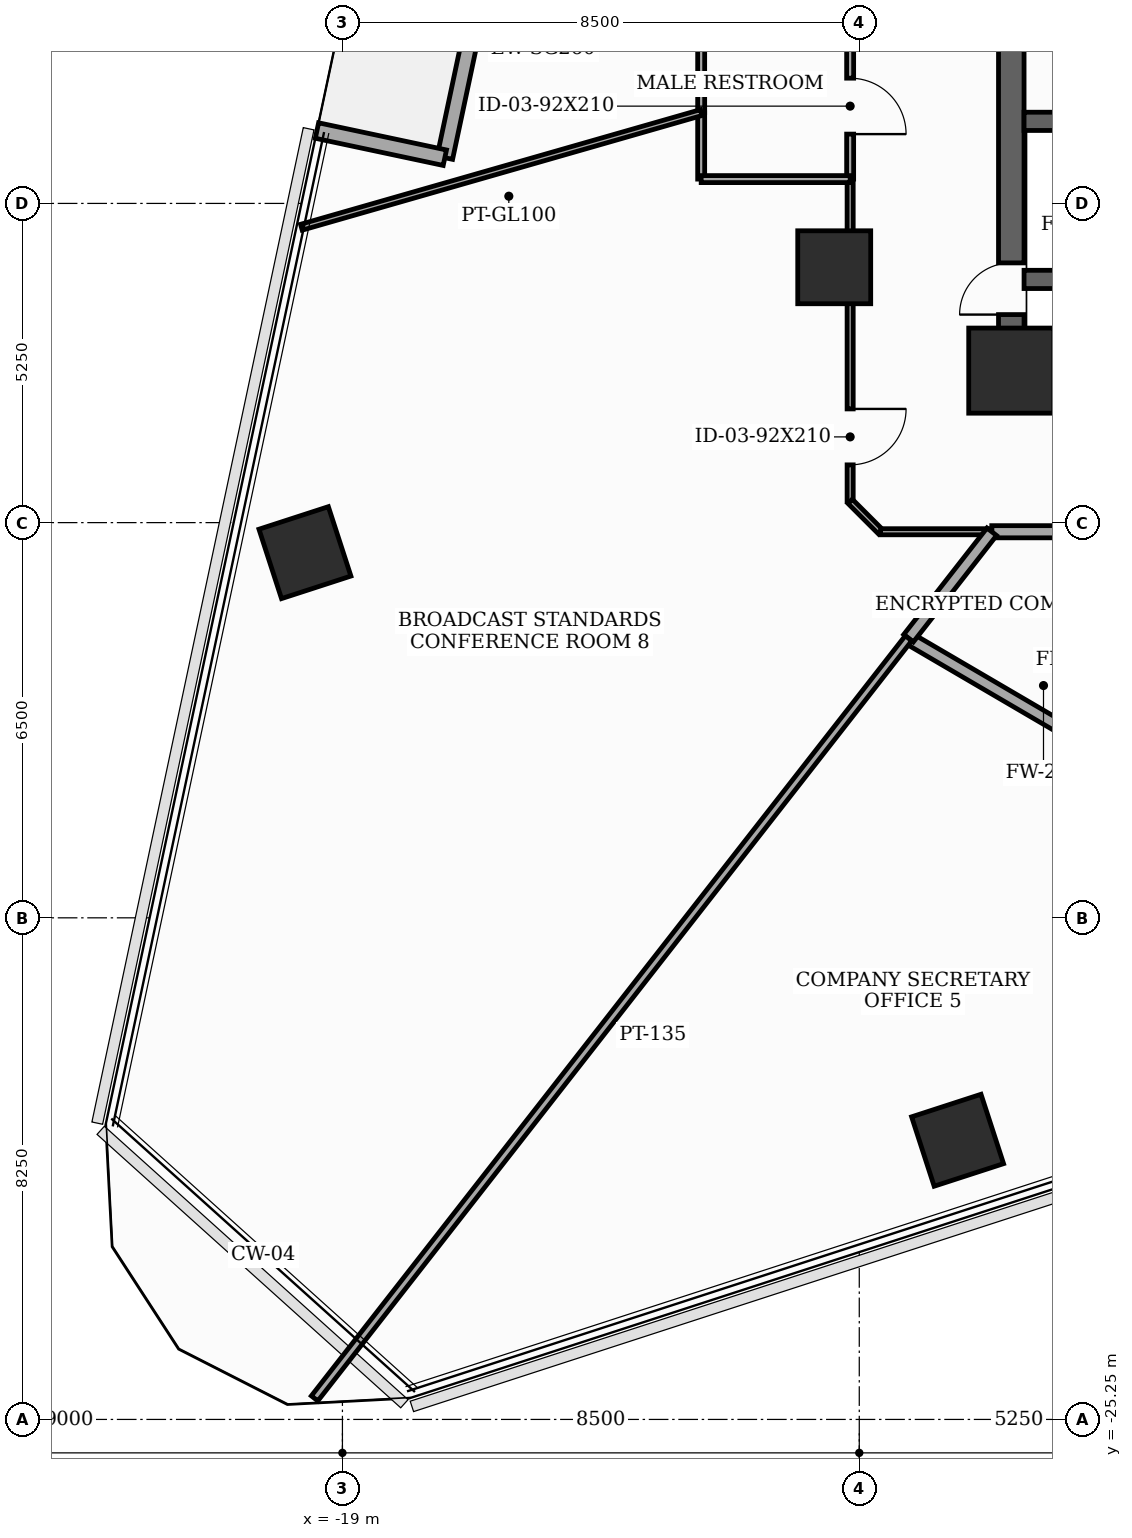
"""IFC4 building model, lengths in metres.
Left out: names, types, materials, properties, quantities, classifications, styles, units other than length and angle.
Written with IfcOpenShell. Run it as: python <this file> out.ifc"""

import sys

from ifc_helpers import new_model, si_unit, direction, frame, frame_2d, origin, origin_2d, place, context, subcontext, project, spatial, rectangle, extrude, element, fill, save


model = new_model("IFC4")
c1 = context("Model", 3, precision=1e-05, world=origin(), true_north=direction((0.0, 1.0)))
c2 = subcontext(c1, "Body", "Model", "MODEL_VIEW")
j1 = project(units=[si_unit("LENGTHUNIT", "METRE"), si_unit("PLANEANGLEUNIT", "RADIAN")], contexts=[c1])
p1 = place(None, origin())
s1 = spatial("IfcSite", under=j1, at=p1, CompositionType="ELEMENT")
p2 = place(p1, origin())
s2 = spatial("IfcBuilding", under=s1, at=p2, CompositionType="ELEMENT")
p3 = place(p2, frame((0.0, 0.0, 112.5)))
s3 = spatial("IfcBuildingStorey", under=s2, at=p3, CompositionType="ELEMENT", Elevation=112.5)
p4 = place(p3, frame((-8.0, -8.0, 0.0), z_axis=(0.0, 0.0, 1.0), x_axis=(1.0, 0.0, 0.0)))
e1 = element("IfcColumn", 1, at=p4, inside=s3, PredefinedType="COLUMN", context=c2, shape_type="SweptSolid", body=[
    extrude(rectangle(XDim=1.4, YDim=1.4, at=origin_2d()), origin(), (0.0, 0.0, 1.0), 3.7),
])
for number, where, z_axis, x_axis in (
    (2, (-10.912, -6.3, 0.0), (0.0, 0.0, 1.0), (1.0, 0.0, 0.0)),
    (3, (-8.883, -20.658, 0.0), (0.0, 0.0, 1.0), (0.951, 0.309, 0.0)),
    (4, (-19.616, -10.994, 0.0), (0.0, 0.0, 1.0), (0.951, 0.309, 0.0)),
):
    element("IfcColumn", number, at=place(p3, frame(where, z_axis=z_axis, x_axis=x_axis)), inside=s3, PredefinedType="COLUMN", context=c2, shape_type="SweptSolid", body=[
        extrude(rectangle(XDim=1.2, YDim=1.2, at=origin_2d()), origin(), (0.0, 0.0, 1.0), 3.7),
    ])
p5 = place(p3, frame((-15.07, 6.066, 0.0), z_axis=(0.0, 0.0, 1.0), x_axis=(-0.207900120229, -0.978150060067, 0.0)))
e5 = element("IfcWall", 5, at=p5, inside=s3, PredefinedType="SOLIDWALL", context=c2, shape_type="SweptSolid", body=[
    extrude(rectangle(XDim=10.8, YDim=0.26, at=frame_2d((5.4, 0.0))), origin(), (0.0, 0.0, 1.0), 3.5),
])
p6 = place(p5, frame((1.75, 0.0, 0.0)))
e6 = element("IfcOpeningElement", 6, at=p6, cuts=e5, PredefinedType="OPENING", context=c2, shape_type="SweptSolid", body=[
    extrude(rectangle(XDim=1.6, YDim=2.08, at=frame_2d((0.8, 1.04))), frame((0.0, 0.14, 0.0), z_axis=(0.0, -1.0, 0.0), x_axis=(1.0, 0.0, 0.0)), (0.0, 0.0, 1.0), 0.28),
])
p7 = place(p5, frame((5.65, 0.0, 0.85)))
e7 = element("IfcOpeningElement", 7, at=p7, cuts=e5, PredefinedType="OPENING", context=c2, shape_type="SweptSolid", body=[
    extrude(rectangle(XDim=1.3, YDim=1.25, at=frame_2d((0.65, 0.625))), frame((0.0, 0.14, 0.0), z_axis=(0.0, -1.0, 0.0), x_axis=(1.0, 0.0, 0.0)), (0.0, 0.0, 1.0), 0.28),
])
p8 = place(p3, frame((-17.316, -4.498, 0.0), z_axis=(0.0, 0.0, 1.0), x_axis=(-0.978146728319, 0.207915795165, 0.0)))
e8 = element("IfcWall", 8, at=p8, inside=s3, PredefinedType="SOLIDWALL", context=c2, shape_type="SweptSolid", body=[
    extrude(rectangle(XDim=2.15, YDim=0.26, at=frame_2d((1.075, 0.0))), origin(), (0.0, 0.0, 1.0), 3.5),
])
p9 = place(p3, frame((-8.0, -8.0, 0.0), z_axis=(0.0, 0.0, 1.0), x_axis=(0.0, 1.0, 0.0)))
e9 = element("IfcWall", 9, at=p9, inside=s3, PredefinedType="SHEAR", context=c2, shape_type="SweptSolid", body=[
    extrude(rectangle(XDim=16.0, YDim=0.42, at=frame_2d((8.0, 0.0))), origin(), (0.0, 0.0, 1.0), 3.5),
])
p10 = place(p9, frame((0.922, 0.0, 0.0)))
e10 = element("IfcOpeningElement", 10, at=p10, cuts=e9, PredefinedType="OPENING", context=c2, shape_type="SweptSolid", body=[
    extrude(rectangle(XDim=0.85, YDim=2.02, at=frame_2d((0.425, 1.01))), frame((0.0, 0.22, 0.0), z_axis=(0.0, -1.0, 0.0), x_axis=(1.0, 0.0, 0.0)), (0.0, 0.0, 1.0), 0.44),
])
p11 = place(p9, frame((5.35, 0.0, 0.0)))
e11 = element("IfcOpeningElement", 11, at=p11, cuts=e9, PredefinedType="OPENING", context=c2, shape_type="SweptSolid", body=[
    extrude(rectangle(XDim=1.05, YDim=2.15, at=frame_2d((0.525, 1.075))), frame((0.0, 0.22, 0.0), z_axis=(0.0, -1.0, 0.0), x_axis=(1.0, 0.0, 0.0)), (0.0, 0.0, 1.0), 0.44),
])
p12 = place(p3, frame((-8.0, -8.0, 0.0), z_axis=(0.0, 0.0, 1.0), x_axis=(1.0, 0.0, 0.0)))
e12 = element("IfcWall", 12, at=p12, inside=s3, PredefinedType="SHEAR", context=c2, shape_type="SweptSolid", body=[
    extrude(rectangle(XDim=16.0, YDim=0.42, at=frame_2d((8.0, 0.0))), origin(), (0.0, 0.0, 1.0), 3.5),
])
p13 = place(p12, frame((4.449, 0.0, 0.0)))
e13 = element("IfcOpeningElement", 13, at=p13, cuts=e12, PredefinedType="OPENING", context=c2, shape_type="SweptSolid", body=[
    extrude(rectangle(XDim=0.85, YDim=2.02, at=frame_2d((0.425, 1.01))), frame((0.0, 0.22, 0.0), z_axis=(0.0, -1.0, 0.0), x_axis=(1.0, 0.0, 0.0)), (0.0, 0.0, 1.0), 0.44),
])
p14 = place(p12, frame((6.49, 0.0, 0.0)))
e14 = element("IfcOpeningElement", 14, at=p14, cuts=e12, PredefinedType="OPENING", context=c2, shape_type="SweptSolid", body=[
    extrude(rectangle(XDim=0.85, YDim=2.02, at=frame_2d((0.425, 1.01))), frame((0.0, 0.22, 0.0), z_axis=(0.0, -1.0, 0.0), x_axis=(1.0, 0.0, 0.0)), (0.0, 0.0, 1.0), 0.44),
])
p15 = place(p12, frame((8.69, 0.0, 0.0)))
e15 = element("IfcOpeningElement", 15, at=p15, cuts=e12, PredefinedType="OPENING", context=c2, shape_type="SweptSolid", body=[
    extrude(rectangle(XDim=0.85, YDim=2.02, at=frame_2d((0.425, 1.01))), frame((0.0, 0.22, 0.0), z_axis=(0.0, -1.0, 0.0), x_axis=(1.0, 0.0, 0.0)), (0.0, 0.0, 1.0), 0.44),
])
p16 = place(p12, frame((10.701, 0.0, 0.0)))
e16 = element("IfcOpeningElement", 16, at=p16, cuts=e12, PredefinedType="OPENING", context=c2, shape_type="SweptSolid", body=[
    extrude(rectangle(XDim=0.85, YDim=2.02, at=frame_2d((0.425, 1.01))), frame((0.0, 0.22, 0.0), z_axis=(0.0, -1.0, 0.0), x_axis=(1.0, 0.0, 0.0)), (0.0, 0.0, 1.0), 0.44),
])
p17 = place(p3, frame((-7.79, -3.9, 0.0), z_axis=(0.0, 0.0, 1.0), x_axis=(1.0, 0.0, 0.0)))
e17 = element("IfcWall", 17, at=p17, inside=s3, PredefinedType="SHEAR", context=c2, shape_type="SweptSolid", body=[
    extrude(rectangle(XDim=3.34, YDim=0.3, at=frame_2d((1.67, 0.0))), origin(), (0.0, 0.0, 1.0), 3.5),
])
p18 = place(p17, frame((1.27, 0.0, 0.0)))
e18 = element("IfcOpeningElement", 18, at=p18, cuts=e17, PredefinedType="OPENING", context=c2, shape_type="SweptSolid", body=[
    extrude(rectangle(XDim=1.1, YDim=2.1, at=frame_2d((0.55, 1.05))), frame((0.0, 0.16, 0.0), z_axis=(0.0, -1.0, 0.0), x_axis=(1.0, 0.0, 0.0)), (0.0, 0.0, 1.0), 0.32),
])
p19 = place(p3, frame((-7.79, -6.5, 0.0), z_axis=(0.0, 0.0, 1.0), x_axis=(1.0, 0.0, 0.0)))
e19 = element("IfcWall", 19, at=p19, inside=s3, PredefinedType="SHEAR", context=c2, shape_type="SweptSolid", body=[
    extrude(rectangle(XDim=3.34, YDim=0.3, at=frame_2d((1.67, 0.0))), origin(), (0.0, 0.0, 1.0), 3.5),
])
p20 = place(p3, frame((-8.321, -10.65, 0.0), z_axis=(0.0, 0.0, 1.0), x_axis=(1.0, 0.0, 0.0)))
e20 = element("IfcWall", 20, at=p20, inside=s3, PredefinedType="SOLIDWALL", context=c2, shape_type="SweptSolid", body=[
    extrude(rectangle(XDim=4.329, YDim=0.2, at=frame_2d((2.165, 0.0))), origin(), (0.0, 0.0, 1.0), 2.785),
])
p21 = place(p3, frame((-10.65, -2.45, 0.0), z_axis=(0.0, 0.0, 1.0), x_axis=(0.0, -1.0, 0.0)))
e21 = element("IfcWall", 21, at=p21, inside=s3, PredefinedType="PARTITIONING", context=c2, shape_type="SweptSolid", body=[
    extrude(rectangle(XDim=2.4, YDim=0.115, at=frame_2d((1.2, 0.0))), origin(), (0.0, 0.0, 1.0), 3.5),
])
p22 = place(p21, frame((0.74, 0.0, 0.0)))
e22 = element("IfcOpeningElement", 22, at=p22, cuts=e21, PredefinedType="OPENING", context=c2, shape_type="SweptSolid", body=[
    extrude(rectangle(XDim=0.92, YDim=2.1, at=frame_2d((0.46, 1.05))), frame((0.0, 0.067, 0.0), z_axis=(0.0, -1.0, 0.0), x_axis=(1.0, 0.0, 0.0)), (0.0, 0.0, 1.0), 0.135),
])
p23 = place(p3, frame((-10.65, -4.85, 0.0), z_axis=(0.0, 0.0, 1.0), x_axis=(0.0, -1.0, 0.0)))
e23 = element("IfcWall", 23, at=p23, inside=s3, PredefinedType="MOVABLE", context=c2, shape_type="SweptSolid", body=[
    extrude(rectangle(XDim=5.3, YDim=0.1, at=frame_2d((2.65, 0.0))), origin(), (0.0, 0.0, 1.0), 2.785),
])
p24 = place(p23, frame((3.78, 0.0, 0.0)))
e24 = element("IfcOpeningElement", 24, at=p24, cuts=e23, PredefinedType="OPENING", context=c2, shape_type="SweptSolid", body=[
    extrude(rectangle(XDim=0.92, YDim=2.1, at=frame_2d((0.46, 1.05))), frame((0.0, 0.06, 0.0), z_axis=(0.0, -1.0, 0.0), x_axis=(1.0, 0.0, 0.0)), (0.0, 0.0, 1.0), 0.12),
])
p25 = place(p3, frame((-10.65, -10.15, 0.0), z_axis=(0.0, 0.0, 1.0), x_axis=(0.707106781187, -0.707106781187, 0.0)))
e25 = element("IfcWall", 25, at=p25, inside=s3, PredefinedType="MOVABLE", context=c2, shape_type="SweptSolid", body=[
    extrude(rectangle(XDim=0.707, YDim=0.1, at=frame_2d((0.354, 0.0))), origin(), (0.0, 0.0, 1.0), 3.5),
])
p26 = place(p3, frame((-10.15, -10.65, 0.0), z_axis=(0.0, 0.0, 1.0), x_axis=(1.0, 0.0, 0.0)))
e26 = element("IfcWall", 26, at=p26, inside=s3, PredefinedType="MOVABLE", context=c2, shape_type="SweptSolid", body=[
    extrude(rectangle(XDim=1.829, YDim=0.1, at=frame_2d((0.915, 0.0))), origin(), (0.0, 0.0, 1.0), 3.5),
])
p27 = place(p3, frame((-9.69, -12.402, 0.0), z_axis=(0.0, 0.0, 1.0), x_axis=(0.863091493537, -0.505047595563, 0.0)))
e27 = element("IfcWall", 27, at=p27, inside=s3, PredefinedType="SOLIDWALL", context=c2, shape_type="SweptSolid", body=[
    extrude(rectangle(XDim=4.617, YDim=0.2, at=frame_2d((2.309, 0.0))), origin(), (0.0, 0.0, 1.0), 2.785),
])
p28 = place(p3, frame((-8.321, -10.65, 0.0), z_axis=(0.0, 0.0, 1.0), x_axis=(-0.615641911247, -0.788026038349, 0.0)))
e28 = element("IfcWall", 28, at=p28, inside=s3, PredefinedType="SOLIDWALL", context=c2, shape_type="SweptSolid", body=[
    extrude(rectangle(XDim=2.224, YDim=0.2, at=frame_2d((1.112, 0.0))), origin(), (0.0, 0.0, 1.0), 3.5),
])
p29 = place(p3, frame((-9.69, -12.402, 0.0), z_axis=(0.0, 0.0, 1.0), x_axis=(-0.615679875475, -0.787996377489, 0.0)))
e29 = element("IfcWall", 29, at=p29, inside=s3, PredefinedType="PARTITIONING", context=c2, shape_type="SweptSolid", body=[
    extrude(rectangle(XDim=15.865, YDim=0.135, at=frame_2d((7.933, 0.0))), origin(), (0.0, 0.0, 1.0), 2.935),
])
p30 = place(p3, frame((-13.1, -3.756, 0.0), z_axis=(0.0, 0.0, 1.0), x_axis=(0.0, -1.0, 0.0)))
e30 = element("IfcWall", 30, at=p30, inside=s3, PredefinedType="PARTITIONING", context=c2, shape_type="SweptSolid", body=[
    extrude(rectangle(XDim=1.094, YDim=0.115, at=frame_2d((0.547, 0.0))), origin(), (0.0, 0.0, 1.0), 3.5),
])
p31 = place(p3, frame((-13.1, -4.85, 0.0), z_axis=(0.0, 0.0, 1.0), x_axis=(1.0, 0.0, 0.0)))
e31 = element("IfcWall", 31, at=p31, inside=s3, PredefinedType="PARTITIONING", context=c2, shape_type="SweptSolid", body=[
    extrude(rectangle(XDim=2.45, YDim=0.115, at=frame_2d((1.225, 0.0))), origin(), (0.0, 0.0, 1.0), 2.785),
])
p32 = place(p3, frame((-13.1, -2.45, 0.0), z_axis=(0.0, 0.0, 1.0), x_axis=(0.0, -1.0, 0.0)))
e32 = element("IfcWall", 32, at=p32, inside=s3, PredefinedType="PARTITIONING", context=c2, shape_type="SweptSolid", body=[
    extrude(rectangle(XDim=1.306, YDim=0.115, at=frame_2d((0.653, 0.0))), origin(), (0.0, 0.0, 1.0), 3.5),
])
p33 = place(p3, frame((-13.1, -3.756, 0.0), z_axis=(0.0, 0.0, 1.0), x_axis=(-0.961255453737, -0.275659124029, 0.0)))
e33 = element("IfcWall", 33, at=p33, inside=s3, PredefinedType="MOVABLE", context=c2, shape_type="SweptSolid", body=[
    extrude(rectangle(XDim=6.84, YDim=0.1, at=frame_2d((3.42, 0.0))), origin(), (0.0, 0.0, 1.0), 2.935),
])
p34 = place(p10, origin())
e34 = element("IfcDoor", 34, at=p34, inside=s3, OperationType="SINGLE_SWING_LEFT", PredefinedType="TRAPDOOR", context=c2, shape_type="SweptSolid", body=[
    extrude(rectangle(XDim=0.85, YDim=2.02, at=frame_2d((0.425, 1.01))), frame((0.0, 0.025, 0.0), z_axis=(0.0, -1.0, 0.0), x_axis=(1.0, 0.0, 0.0)), (0.0, 0.0, 1.0), 0.05),
])
fill(e10, e34)
p35 = place(p22, origin())
e35 = element("IfcDoor", 35, at=p35, inside=s3, OperationType="SINGLE_SWING_RIGHT", PredefinedType="DOOR", context=c2, shape_type="SweptSolid", body=[
    extrude(rectangle(XDim=0.92, YDim=2.1, at=frame_2d((0.46, 1.05))), frame((0.0, 0.025, 0.0), z_axis=(0.0, -1.0, 0.0), x_axis=(1.0, 0.0, 0.0)), (0.0, 0.0, 1.0), 0.05),
])
fill(e22, e35)
p36 = place(p24, origin())
e36 = element("IfcDoor", 36, at=p36, inside=s3, OperationType="SINGLE_SWING_LEFT", PredefinedType="DOOR", context=c2, shape_type="SweptSolid", body=[
    extrude(rectangle(XDim=0.92, YDim=2.1, at=frame_2d((0.46, 1.05))), frame((0.0, 0.025, 0.0), z_axis=(0.0, -1.0, 0.0), x_axis=(1.0, 0.0, 0.0)), (0.0, 0.0, 1.0), 0.05),
])
fill(e24, e36)
save(model, sys.argv[1])
